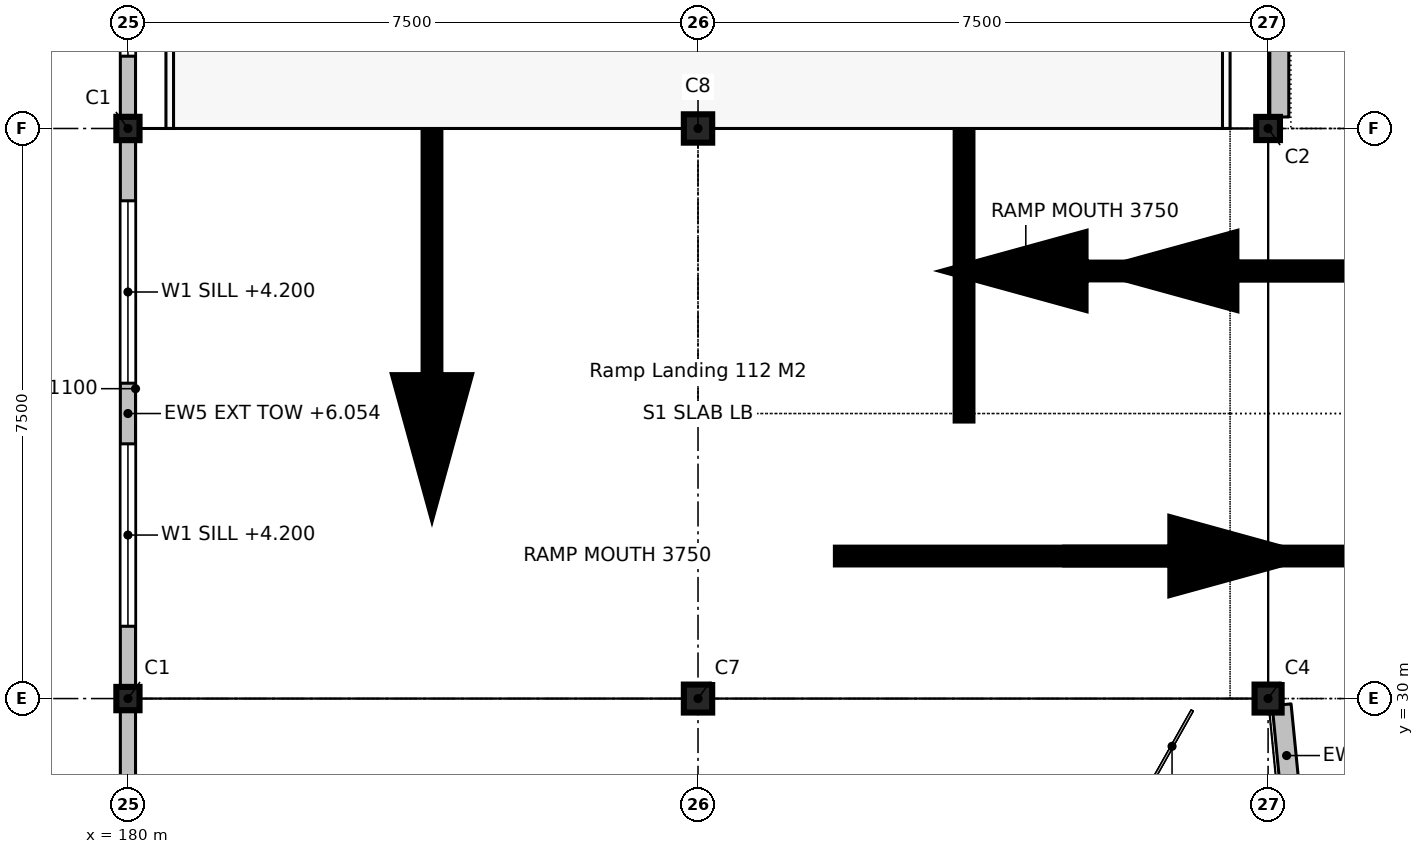
"""IFC4 building model, lengths in metres.
Left out: names, types, materials, properties, quantities, classifications, styles, units other than length and angle.
Written with IfcOpenShell. Run it as: python <this file> out.ifc"""

import sys

from ifc_helpers import new_model, si_unit, direction, frame, frame_2d, origin, origin_2d, place, context, subcontext, project, spatial, rectangle, i_section, extrude, element, fill, save


model = new_model("IFC4")
c1 = context("Model", 3, precision=1e-05, world=origin(), true_north=direction((0.0, 1.0)))
c2 = subcontext(c1, "Body", "Model", "MODEL_VIEW")
j1 = project(units=[si_unit("LENGTHUNIT", "METRE"), si_unit("PLANEANGLEUNIT", "RADIAN")], contexts=[c1])
p1 = place(None, origin())
s1 = spatial("IfcSite", under=j1, at=p1, CompositionType="ELEMENT")
p2 = place(p1, origin())
s2 = spatial("IfcBuilding", under=s1, at=p2, CompositionType="ELEMENT")
p3 = place(p2, frame((0.0, 0.0, 3.3)))
s3 = spatial("IfcBuildingStorey", under=s2, at=p3, CompositionType="ELEMENT", Elevation=3.3)
for number, where, z_axis, x_axis in (
    (1, (180.0, 30.0, 0.0), (0.0, 0.0, 1.0), (1.0, 0.0, 0.0)),
    (2, (180.0, 37.5, 0.0), (0.0, 0.0, 1.0), (1.0, 0.0, 0.0)),
):
    element("IfcColumn", number, at=place(p3, frame(where, z_axis=z_axis, x_axis=x_axis)), inside=s3, PredefinedType="COLUMN", context=c2, shape_type="SweptSolid", body=[
        extrude(i_section(OverallWidth=0.305, OverallDepth=0.307, WebThickness=0.01, FlangeThickness=0.015, FilletRadius=0.015, at=origin_2d()), origin(), (0.0, 0.0, 1.0), 3.3),
    ])
p4 = place(p3, frame((187.5, 30.0, 0.0), z_axis=(0.0, 0.0, 1.0), x_axis=(1.0, 0.0, 0.0)))
e3 = element("IfcColumn", 3, at=p4, inside=s3, PredefinedType="COLUMN", context=c2, shape_type="SweptSolid", body=[
    extrude(i_section(OverallWidth=0.373, OverallDepth=0.368, WebThickness=0.015, FlangeThickness=0.024, FilletRadius=0.015, at=origin_2d()), origin(), (0.0, 0.0, 1.0), 3.3),
])
p5 = place(p3, frame((187.5, 37.5, 0.0), z_axis=(0.0, 0.0, 1.0), x_axis=(1.0, 0.0, 0.0)))
e4 = element("IfcColumn", 4, at=p5, inside=s3, PredefinedType="COLUMN", context=c2, shape_type="SweptSolid", body=[
    extrude(i_section(OverallWidth=0.373, OverallDepth=0.373, WebThickness=0.016, FlangeThickness=0.026, FilletRadius=0.015, at=origin_2d()), origin(), (0.0, 0.0, 1.0), 3.3),
])
p6 = place(p3, frame((195.0, 37.5, 0.0), z_axis=(0.0, 0.0, 1.0), x_axis=(0.0, 1.0, 0.0)))
e5 = element("IfcColumn", 5, at=p6, inside=s3, PredefinedType="COLUMN", context=c2, shape_type="SweptSolid", body=[
    extrude(i_section(OverallWidth=0.305, OverallDepth=0.312, WebThickness=0.011, FlangeThickness=0.017, FilletRadius=0.015, at=origin_2d()), origin(), (0.0, 0.0, 1.0), 3.3),
])
p7 = place(p3, frame((195.0, 30.0, 0.0), z_axis=(0.0, 0.0, 1.0), x_axis=(0.0, 1.0, 0.0)))
e6 = element("IfcColumn", 6, at=p7, inside=s3, PredefinedType="COLUMN", context=c2, shape_type="SweptSolid", body=[
    extrude(i_section(OverallWidth=0.368, OverallDepth=0.356, WebThickness=0.011, FlangeThickness=0.018, FilletRadius=0.015, at=origin_2d()), origin(), (0.0, 0.0, 1.0), 3.3),
])
p8 = place(p3, frame((195.147, 44.848, 0.0), z_axis=(0.0, 0.0, 1.0), x_axis=(0.0, -1.0, 0.0)))
e7 = element("IfcWall", 7, at=p8, inside=s3, PredefinedType="SOLIDWALL", context=c2, shape_type="SweptSolid", body=[
    extrude(rectangle(XDim=7.197, YDim=0.25, at=frame_2d((3.598, 0.0))), origin(), (0.0, 0.0, 1.0), 1.1),
])
p9 = place(p3, frame((195.178, 29.918, 0.0), z_axis=(0.0, 0.0, 1.0), x_axis=(0.097900088064, -0.995196248364, 0.0)))
e8 = element("IfcWall", 8, at=p9, inside=s3, PredefinedType="SOLIDWALL", context=c2, shape_type="SweptSolid", body=[
    extrude(rectangle(XDim=1.342, YDim=0.25, at=frame_2d((0.671, 0.0))), origin(), (0.0, 0.0, 1.0), 1.1),
])
p10 = place(p3, frame((180.0, 22.654, 0.0), z_axis=(0.0, 0.0, 1.0), x_axis=(0.0, 1.0, 0.0)))
e9 = element("IfcWall", 9, at=p10, inside=s3, PredefinedType="SOLIDWALL", context=c2, shape_type="SweptSolid", body=[
    extrude(rectangle(XDim=7.193, YDim=0.2, at=frame_2d((3.596, 0.0))), origin(), (0.0, 0.0, 1.0), 2.71),
])
p11 = place(p10, frame((1.098, 0.0, 1.1)))
e10 = element("IfcOpeningElement", 10, at=p11, cuts=e9, PredefinedType="OPENING", context=c2, shape_type="SweptSolid", body=[
    extrude(rectangle(XDim=1.8, YDim=1.4, at=frame_2d((0.9, 0.7))), frame((0.0, 0.11, 0.0), z_axis=(0.0, -1.0, 0.0), x_axis=(1.0, 0.0, 0.0)), (0.0, 0.0, 1.0), 0.22),
])
p12 = place(p10, frame((4.295, 0.0, 1.1)))
e11 = element("IfcOpeningElement", 11, at=p12, cuts=e9, PredefinedType="OPENING", context=c2, shape_type="SweptSolid", body=[
    extrude(rectangle(XDim=1.8, YDim=1.4, at=frame_2d((0.9, 0.7))), frame((0.0, 0.11, 0.0), z_axis=(0.0, -1.0, 0.0), x_axis=(1.0, 0.0, 0.0)), (0.0, 0.0, 1.0), 0.22),
])
p13 = place(p3, frame((180.0, 30.154, 0.0), z_axis=(0.0, 0.0, 1.0), x_axis=(0.0, 1.0, 0.0)))
e12 = element("IfcWall", 12, at=p13, inside=s3, PredefinedType="SOLIDWALL", context=c2, shape_type="SweptSolid", body=[
    extrude(rectangle(XDim=7.193, YDim=0.2, at=frame_2d((3.596, 0.0))), origin(), (0.0, 0.0, 1.0), 2.754),
])
p14 = place(p13, frame((0.798, 0.0, 0.9)))
e13 = element("IfcOpeningElement", 13, at=p14, cuts=e12, PredefinedType="OPENING", context=c2, shape_type="SweptSolid", body=[
    extrude(rectangle(XDim=2.4, YDim=1.5, at=frame_2d((1.2, 0.75))), frame((0.0, 0.11, 0.0), z_axis=(0.0, -1.0, 0.0), x_axis=(1.0, 0.0, 0.0)), (0.0, 0.0, 1.0), 0.22),
])
p15 = place(p13, frame((3.995, 0.0, 0.9)))
e14 = element("IfcOpeningElement", 14, at=p15, cuts=e12, PredefinedType="OPENING", context=c2, shape_type="SweptSolid", body=[
    extrude(rectangle(XDim=2.4, YDim=1.5, at=frame_2d((1.2, 0.75))), frame((0.0, 0.11, 0.0), z_axis=(0.0, -1.0, 0.0), x_axis=(1.0, 0.0, 0.0)), (0.0, 0.0, 1.0), 0.22),
])
p16 = place(p3, frame((180.0, 37.654, 0.0), z_axis=(0.0, 0.0, 1.0), x_axis=(0.0, 1.0, 0.0)))
e15 = element("IfcWall", 15, at=p16, inside=s3, PredefinedType="SOLIDWALL", context=c2, shape_type="SweptSolid", body=[
    extrude(rectangle(XDim=7.193, YDim=0.2, at=frame_2d((3.596, 0.0))), origin(), (0.0, 0.0, 1.0), 2.71),
])
p17 = place(p16, frame((0.798, 0.0, 0.9)))
e16 = element("IfcOpeningElement", 16, at=p17, cuts=e15, PredefinedType="OPENING", context=c2, shape_type="SweptSolid", body=[
    extrude(rectangle(XDim=2.4, YDim=1.5, at=frame_2d((1.2, 0.75))), frame((0.0, 0.11, 0.0), z_axis=(0.0, -1.0, 0.0), x_axis=(1.0, 0.0, 0.0)), (0.0, 0.0, 1.0), 0.22),
])
p18 = place(p16, frame((3.995, 0.0, 0.9)))
e17 = element("IfcOpeningElement", 17, at=p18, cuts=e15, PredefinedType="OPENING", context=c2, shape_type="SweptSolid", body=[
    extrude(rectangle(XDim=2.4, YDim=1.5, at=frame_2d((1.2, 0.75))), frame((0.0, 0.11, 0.0), z_axis=(0.0, -1.0, 0.0), x_axis=(1.0, 0.0, 0.0)), (0.0, 0.0, 1.0), 0.22),
])
p19 = place(p14, origin())
e18 = element("IfcWindow", 18, at=p19, inside=s3, PartitioningType="DOUBLE_PANEL_VERTICAL", PredefinedType="WINDOW", context=c2, shape_type="SweptSolid", body=[
    extrude(rectangle(XDim=2.4, YDim=1.5, at=frame_2d((1.2, 0.75))), frame((0.0, 0.03, 0.0), z_axis=(0.0, -1.0, 0.0), x_axis=(1.0, 0.0, 0.0)), (0.0, 0.0, 1.0), 0.06),
])
fill(e13, e18)
p20 = place(p15, origin())
e19 = element("IfcWindow", 19, at=p20, inside=s3, PartitioningType="DOUBLE_PANEL_VERTICAL", PredefinedType="WINDOW", context=c2, shape_type="SweptSolid", body=[
    extrude(rectangle(XDim=2.4, YDim=1.5, at=frame_2d((1.2, 0.75))), frame((0.0, 0.03, 0.0), z_axis=(0.0, -1.0, 0.0), x_axis=(1.0, 0.0, 0.0)), (0.0, 0.0, 1.0), 0.06),
])
fill(e14, e19)
p21 = place(p17, origin())
e20 = element("IfcWindow", 20, at=p21, inside=s3, PartitioningType="DOUBLE_PANEL_VERTICAL", PredefinedType="WINDOW", context=c2, shape_type="SweptSolid", body=[
    extrude(rectangle(XDim=2.4, YDim=1.5, at=frame_2d((1.2, 0.75))), frame((0.0, 0.03, 0.0), z_axis=(0.0, -1.0, 0.0), x_axis=(1.0, 0.0, 0.0)), (0.0, 0.0, 1.0), 0.06),
])
fill(e16, e20)
save(model, sys.argv[1])
